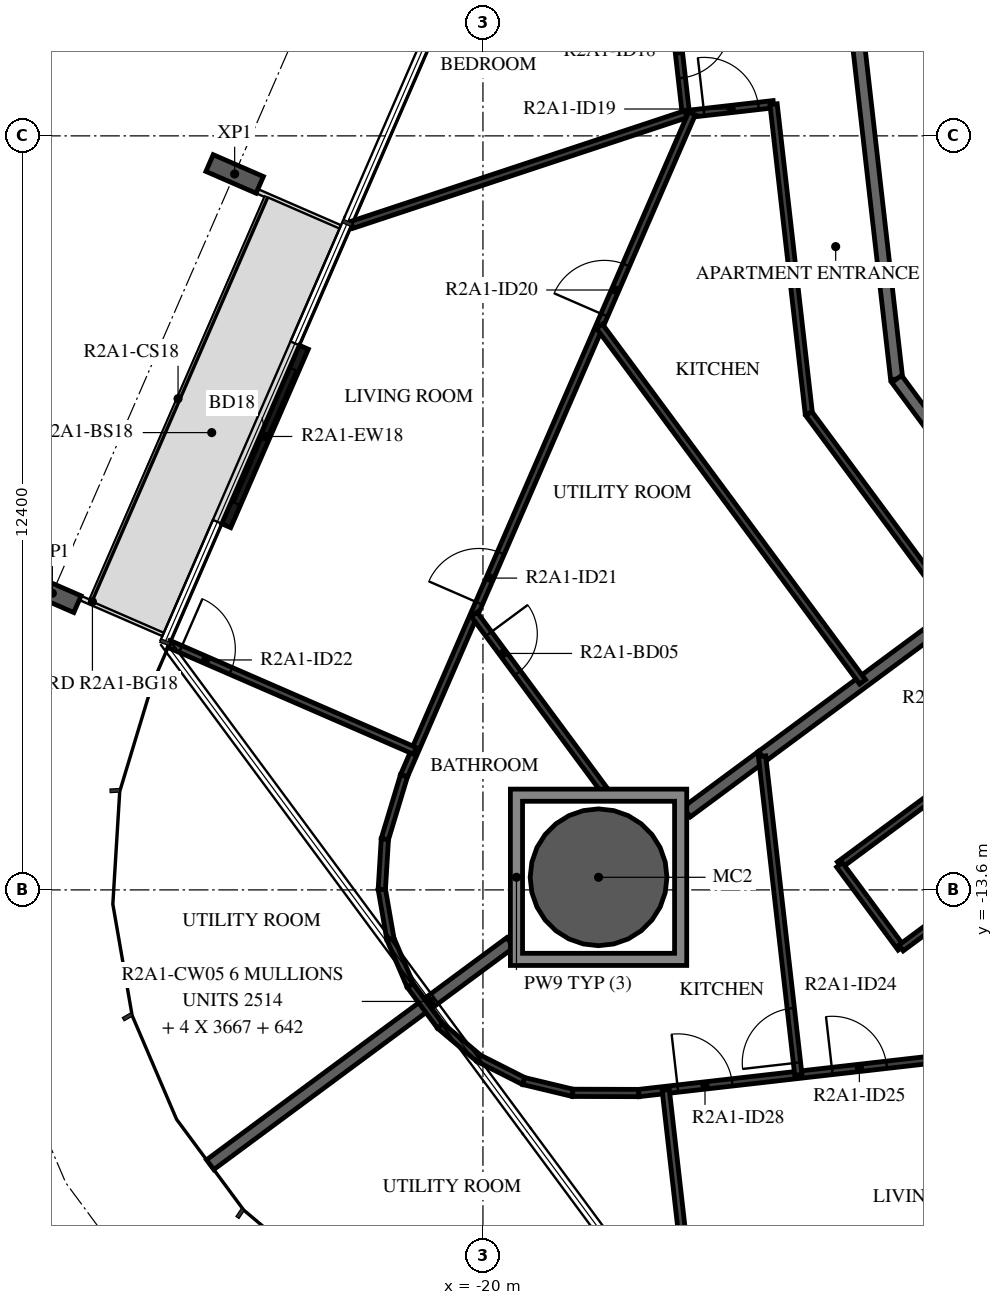
"""IFC4 building model, lengths in metres.
Left out: names, types, materials, properties, quantities, classifications, styles, units other than length and angle.
Written with IfcOpenShell. Run it as: python <this file> out.ifc"""

import sys

from ifc_helpers import new_model, si_unit, direction, frame, frame_2d, origin, origin_2d, place, context, subcontext, project, spatial, polyline, rectangle, hollow_circle, i_section, outline, extrude, element, fill, save


model = new_model("IFC4")
c1 = context("Model", 3, precision=1e-05, world=origin(), true_north=direction((0.0, 1.0)))
c2 = subcontext(c1, "Body", "Model", "MODEL_VIEW")
j1 = project(units=[si_unit("LENGTHUNIT", "METRE"), si_unit("PLANEANGLEUNIT", "RADIAN")], contexts=[c1])
p1 = place(None, origin())
s1 = spatial("IfcSite", under=j1, at=p1, CompositionType="ELEMENT")
p2 = place(p1, origin())
s2 = spatial("IfcBuilding", under=s1, at=p2, CompositionType="ELEMENT")
p3 = place(p2, frame((0.0, 0.0, 80.2)))
s3 = spatial("IfcBuildingStorey", under=s2, at=p3, CompositionType="ELEMENT", Elevation=80.2)
p4 = place(p3, frame((-18.099, -13.393, -0.38), z_axis=(0.0, 0.0, 1.0), x_axis=(1.0, 0.0, 0.0)))
e1 = element("IfcColumn", 1, at=p4, inside=s3, PredefinedType="COLUMN", context=c2, shape_type="SweptSolid", body=[
    extrude(hollow_circle(Radius=1.125, WallThickness=0.055, at=origin_2d()), origin(), (0.0, 0.0, 1.0), 3.5),
])
for number, where, z_axis, x_axis in (
    (2, (-24.083, -1.826, -0.38), (0.0, 0.0, 1.0), (0.399, 0.917, 0.0)),
    (3, (-27.081, -8.722, -0.38), (0.0, 0.0, 1.0), (0.399, 0.917, 0.0)),
):
    element("IfcColumn", number, at=place(p3, frame(where, z_axis=z_axis, x_axis=x_axis)), inside=s3, PredefinedType="COLUMN", context=c2, shape_type="SweptSolid", body=[
        extrude(i_section(OverallWidth=0.3, OverallDepth=0.9, WebThickness=0.019, FlangeThickness=0.035, FilletRadius=0.03, at=origin_2d()), origin(), (0.0, 0.0, 1.0), 3.5),
    ])
p5 = place(p3, frame((-22.945, -4.676, 0.0), z_axis=(0.0, 0.0, 1.0), x_axis=(-0.398784695066, -0.917044582876, 0.0)))
e4 = element("IfcWall", 4, at=p5, inside=s3, PredefinedType="STANDARD", context=c2, shape_type="SweptSolid", body=[
    extrude(rectangle(XDim=3.2, YDim=0.16, at=frame_2d((1.6, 0.0))), origin(), (0.0, 0.0, 1.0), 3.12),
])
p6 = place(p5, frame((0.4, 0.0, 0.0)))
e5 = element("IfcOpeningElement", 5, at=p6, cuts=e4, PredefinedType="OPENING", context=c2, shape_type="SweptSolid", body=[
    extrude(rectangle(XDim=2.4, YDim=2.4, at=frame_2d((1.2, 1.2))), frame((0.0, 0.09, 0.0), z_axis=(0.0, -1.0, 0.0), x_axis=(1.0, 0.0, 0.0)), (0.0, 0.0, 1.0), 0.18),
])
p7 = place(p3, frame((-14.013, 1.974, 0.0), z_axis=(0.0, 0.0, 1.0), x_axis=(0.113196526349, -0.993572617589, 0.0)))
e6 = element("IfcWall", 6, at=p7, inside=s3, PredefinedType="STANDARD", context=c2, shape_type="SweptSolid", body=[
    extrude(rectangle(XDim=7.219, YDim=0.2, at=frame_2d((3.609, 0.0))), origin(), (0.0, 0.0, 1.0), 3.12),
])
p8 = place(p7, frame((0.2, 0.0, 0.0)))
e7 = element("IfcOpeningElement", 7, at=p8, cuts=e6, PredefinedType="OPENING", context=c2, shape_type="SweptSolid", body=[
    extrude(rectangle(XDim=1.0, YDim=2.1, at=frame_2d((0.5, 1.05))), frame((0.0, 0.11, 0.0), z_axis=(0.0, -1.0, 0.0), x_axis=(1.0, 0.0, 0.0)), (0.0, 0.0, 1.0), 0.22),
])
p9 = place(p3, frame((-13.196, -5.198, 0.0), z_axis=(0.0, 0.0, 1.0), x_axis=(0.594805187394, -0.803869883159, 0.0)))
e8 = element("IfcWall", 8, at=p9, inside=s3, PredefinedType="STANDARD", context=c2, shape_type="SweptSolid", body=[
    extrude(rectangle(XDim=7.342, YDim=0.2, at=frame_2d((3.671, 0.0))), origin(), (0.0, 0.0, 1.0), 3.12),
])
p10 = place(p3, frame((-15.41, -11.403, 0.0), z_axis=(0.0, 0.0, 1.0), x_axis=(0.803887568227, 0.594781285558, 0.0)))
e9 = element("IfcWall", 9, at=p10, inside=s3, PredefinedType="STANDARD", context=c2, shape_type="SweptSolid", body=[
    extrude(rectangle(XDim=5.47, YDim=0.2, at=frame_2d((2.735, 0.0))), origin(), (0.0, 0.0, 1.0), 3.12),
])
p11 = place(p3, frame((-16.649, -12.32, 0.0), z_axis=(0.0, 0.0, 1.0), x_axis=(0.803804030903, 0.594894175383, 0.0)))
e10 = element("IfcWall", 10, at=p11, inside=s3, PredefinedType="STANDARD", context=c2, shape_type="SweptSolid", body=[
    extrude(rectangle(XDim=1.542, YDim=0.2, at=frame_2d((0.771, 0.0))), origin(), (0.0, 0.0, 1.0), 3.12),
])
p12 = place(p3, frame((-24.486, -18.119, 0.0), z_axis=(0.0, 0.0, 1.0), x_axis=(0.80384227933, 0.594842491726, 0.0)))
e11 = element("IfcWall", 11, at=p12, inside=s3, PredefinedType="STANDARD", context=c2, shape_type="SweptSolid", body=[
    extrude(rectangle(XDim=6.142, YDim=0.2, at=frame_2d((3.071, 0.0))), origin(), (0.0, 0.0, 1.0), 3.12),
])
p13 = place(p3, frame((-16.854, 0.846, 0.0), z_axis=(0.0, 0.0, 1.0), x_axis=(0.113173930474, -0.993575191649, 0.0)))
e12 = element("IfcWall", 12, at=p13, inside=s3, PredefinedType="PARTITIONING", context=c2, shape_type="SweptSolid", body=[
    extrude(rectangle(XDim=1.7, YDim=0.12, at=frame_2d((0.85, 0.0))), origin(), (0.0, 0.0, 1.0), 3.12),
])
p14 = place(p13, frame((0.2, 0.0, 0.0)))
e13 = element("IfcOpeningElement", 13, at=p14, cuts=e12, PredefinedType="OPENING", context=c2, shape_type="SweptSolid", body=[
    extrude(rectangle(XDim=0.9, YDim=2.1, at=frame_2d((0.45, 1.05))), frame((0.0, 0.07, 0.0), z_axis=(0.0, -1.0, 0.0), x_axis=(1.0, 0.0, 0.0)), (0.0, 0.0, 1.0), 0.14),
])
p15 = place(p3, frame((-16.563, -0.832, 0.0), z_axis=(0.0, 0.0, 1.0), x_axis=(0.993578035261, 0.113148963084, 0.0)))
e14 = element("IfcWall", 14, at=p15, inside=s3, PredefinedType="PARTITIONING", context=c2, shape_type="SweptSolid", body=[
    extrude(rectangle(XDim=1.351, YDim=0.12, at=frame_2d((0.675, 0.0))), origin(), (0.0, 0.0, 1.0), 3.12),
])
p16 = place(p15, frame((0.2, 0.0, 0.0)))
e15 = element("IfcOpeningElement", 15, at=p16, cuts=e14, PredefinedType="OPENING", context=c2, shape_type="SweptSolid", body=[
    extrude(rectangle(XDim=0.9, YDim=2.1, at=frame_2d((0.45, 1.05))), frame((0.0, 0.07, 0.0), z_axis=(0.0, -1.0, 0.0), x_axis=(1.0, 0.0, 0.0)), (0.0, 0.0, 1.0), 0.14),
])
p17 = place(p3, frame((-15.221, -0.679, 0.0), z_axis=(0.0, 0.0, 1.0), x_axis=(0.113219875647, -0.993569957154, 0.0)))
e16 = element("IfcWall", 16, at=p17, inside=s3, PredefinedType="PARTITIONING", context=c2, shape_type="SweptSolid", body=[
    extrude(rectangle(XDim=5.121, YDim=0.12, at=frame_2d((2.561, 0.0))), origin(), (0.0, 0.0, 1.0), 3.12),
])
p18 = place(p3, frame((-14.641, -5.767, 0.0), z_axis=(0.0, 0.0, 1.0), x_axis=(0.594825885962, -0.803854567313, 0.0)))
e17 = element("IfcWall", 17, at=p18, inside=s3, PredefinedType="PARTITIONING", context=c2, shape_type="SweptSolid", body=[
    extrude(rectangle(XDim=6.266, YDim=0.12, at=frame_2d((3.133, 0.0))), origin(), (0.0, 0.0, 1.0), 3.12),
])
p19 = place(p18, frame((4.273, 0.0, 0.0)))
e18 = element("IfcOpeningElement", 18, at=p19, cuts=e17, PredefinedType="OPENING", context=c2, shape_type="SweptSolid", body=[
    extrude(rectangle(XDim=0.9, YDim=2.1, at=frame_2d((0.45, 1.05))), frame((0.0, 0.07, 0.0), z_axis=(0.0, -1.0, 0.0), x_axis=(1.0, 0.0, 0.0)), (0.0, 0.0, 1.0), 0.14),
])
p20 = place(p3, frame((-22.157, -2.664, 0.0), z_axis=(0.0, 0.0, 1.0), x_axis=(0.949263673698, 0.314481283698, 0.0)))
e19 = element("IfcWall", 19, at=p20, inside=s3, PredefinedType="PARTITIONING", context=c2, shape_type="SweptSolid", body=[
    extrude(rectangle(XDim=5.789, YDim=0.12, at=frame_2d((2.895, 0.0))), origin(), (0.0, 0.0, 1.0), 3.12),
])
p21 = place(p3, frame((-21.298, -11.722, 0.0), z_axis=(0.0, 0.0, 1.0), x_axis=(0.398737387658, 0.917065153456, 0.0)))
e20 = element("IfcWall", 20, at=p21, inside=s3, PredefinedType="PARTITIONING", context=c2, shape_type="SweptSolid", body=[
    extrude(rectangle(XDim=11.875, YDim=0.12, at=frame_2d((5.938, 0.0))), origin(), (0.0, 0.0, 1.0), 3.12),
])
p22 = place(p21, frame((8.26, 0.0, 0.0)))
e21 = element("IfcOpeningElement", 21, at=p22, cuts=e20, PredefinedType="OPENING", context=c2, shape_type="SweptSolid", body=[
    extrude(rectangle(XDim=0.9, YDim=2.1, at=frame_2d((0.45, 1.05))), frame((0.0, 0.07, 0.0), z_axis=(0.0, -1.0, 0.0), x_axis=(1.0, 0.0, 0.0)), (0.0, 0.0, 1.0), 0.14),
])
p23 = place(p21, frame((3.094, 0.0, 0.0)))
e22 = element("IfcOpeningElement", 22, at=p23, cuts=e20, PredefinedType="OPENING", context=c2, shape_type="SweptSolid", body=[
    extrude(rectangle(XDim=0.9, YDim=2.1, at=frame_2d((0.45, 1.05))), frame((0.0, 0.07, 0.0), z_axis=(0.0, -1.0, 0.0), x_axis=(1.0, 0.0, 0.0)), (0.0, 0.0, 1.0), 0.14),
])
p24 = place(p3, frame((-25.156, -9.559, 0.0), z_axis=(0.0, 0.0, 1.0), x_axis=(0.917042707292, -0.398789008127, 0.0)))
e23 = element("IfcWall", 23, at=p24, inside=s3, PredefinedType="PARTITIONING", context=c2, shape_type="SweptSolid", body=[
    extrude(rectangle(XDim=4.4, YDim=0.12, at=frame_2d((2.2, 0.0))), origin(), (0.0, 0.0, 1.0), 2.73),
])
p25 = place(p24, frame((0.2, 0.0, 0.0)))
e24 = element("IfcOpeningElement", 24, at=p25, cuts=e23, PredefinedType="OPENING", context=c2, shape_type="SweptSolid", body=[
    extrude(rectangle(XDim=0.9, YDim=2.1, at=frame_2d((0.45, 1.05))), frame((0.0, 0.07, 0.0), z_axis=(0.0, -1.0, 0.0), x_axis=(1.0, 0.0, 0.0)), (0.0, 0.0, 1.0), 0.14),
])
p26 = place(p3, frame((-18.084, -4.331, 0.0), z_axis=(0.0, 0.0, 1.0), x_axis=(0.594811782108, -0.803865003508, 0.0)))
e25 = element("IfcWall", 25, at=p26, inside=s3, PredefinedType="PARTITIONING", context=c2, shape_type="SweptSolid", body=[
    extrude(rectangle(XDim=7.276, YDim=0.12, at=frame_2d((3.638, 0.0))), origin(), (0.0, 0.0, 1.0), 3.12),
])
p27 = place(p3, frame((-20.144, -9.068, 0.0), z_axis=(0.0, 0.0, 1.0), x_axis=(0.59487477233, -0.803818390711, 0.0)))
e26 = element("IfcWall", 26, at=p27, inside=s3, PredefinedType="PARTITIONING", context=c2, shape_type="SweptSolid", body=[
    extrude(rectangle(XDim=3.575, YDim=0.12, at=frame_2d((1.788, 0.0))), origin(), (0.0, 0.0, 1.0), 3.12),
])
p28 = place(p27, frame((0.4, 0.0, 0.0)))
e27 = element("IfcOpeningElement", 27, at=p28, cuts=e26, PredefinedType="OPENING", context=c2, shape_type="SweptSolid", body=[
    extrude(rectangle(XDim=0.8, YDim=2.1, at=frame_2d((0.4, 1.05))), frame((0.0, 0.07, 0.0), z_axis=(0.0, -1.0, 0.0), x_axis=(1.0, 0.0, 0.0)), (0.0, 0.0, 1.0), 0.14),
])
for number, where, z_axis, x_axis in (
    (28, (-20.703, -15.835, 0.0), (0.0, 0.0, 1.0), (-0.595, 0.804, 0.0)),
    (29, (-21.196, -15.168, 0.0), (0.0, 0.0, 1.0), (-0.394, 0.919, 0.0)),
):
    element("IfcWall", number, at=place(p3, frame(where, z_axis=z_axis, x_axis=x_axis)), inside=s3, PredefinedType="PARTITIONING", context=c2, shape_type="SweptSolid", body=[
        extrude(rectangle(XDim=0.829, YDim=0.12, at=frame_2d((0.415, 0.0))), origin(), (0.0, 0.0, 1.0), 3.12),
    ])
p29 = place(p3, frame((-21.522, -14.406, 0.0), z_axis=(0.0, 0.0, 1.0), x_axis=(-0.170794347099, 0.985306698952, 0.0)))
e30 = element("IfcWall", 30, at=p29, inside=s3, PredefinedType="PARTITIONING", context=c2, shape_type="SweptSolid", body=[
    extrude(rectangle(XDim=0.829, YDim=0.12, at=frame_2d((0.415, 0.0))), origin(), (0.0, 0.0, 1.0), 3.12),
])
p30 = place(p3, frame((-21.664, -13.59, 0.0), z_axis=(0.0, 0.0, 1.0), x_axis=(0.061277779288, 0.998120751095, 0.0)))
e31 = element("IfcWall", 31, at=p30, inside=s3, PredefinedType="PARTITIONING", context=c2, shape_type="SweptSolid", body=[
    extrude(rectangle(XDim=0.829, YDim=0.12, at=frame_2d((0.414, 0.0))), origin(), (0.0, 0.0, 1.0), 3.12),
])
p31 = place(p3, frame((-21.613, -12.762, 0.0), z_axis=(0.0, 0.0, 1.0), x_axis=(0.289552239308, 0.95716221233, 0.0)))
e32 = element("IfcWall", 32, at=p31, inside=s3, PredefinedType="PARTITIONING", context=c2, shape_type="SweptSolid", body=[
    extrude(rectangle(XDim=1.087, YDim=0.12, at=frame_2d((0.543, 0.0))), origin(), (0.0, 0.0, 1.0), 3.12),
])
p32 = place(p3, frame((-10.914, -10.804, 0.0), z_axis=(0.0, 0.0, 1.0), x_axis=(-0.803864616889, -0.594812304609, 0.0)))
e33 = element("IfcWall", 33, at=p32, inside=s3, PredefinedType="PARTITIONING", context=c2, shape_type="SweptSolid", body=[
    extrude(rectangle(XDim=4.008, YDim=0.12, at=frame_2d((2.004, 0.0))), origin(), (0.0, 0.0, 1.0), 3.12),
])
p33 = place(p3, frame((-14.136, -13.188, 0.0), z_axis=(0.0, 0.0, 1.0), x_axis=(0.594863421241, -0.803826791087, 0.0)))
e34 = element("IfcWall", 34, at=p33, inside=s3, PredefinedType="PARTITIONING", context=c2, shape_type="SweptSolid", body=[
    extrude(rectangle(XDim=1.7, YDim=0.12, at=frame_2d((0.85, 0.0))), origin(), (0.0, 0.0, 1.0), 3.12),
])
p34 = place(p3, frame((-13.125, -14.555, 0.0), z_axis=(0.0, 0.0, 1.0), x_axis=(0.80389374229, 0.594772940799, 0.0)))
e35 = element("IfcWall", 35, at=p34, inside=s3, PredefinedType="PARTITIONING", context=c2, shape_type="SweptSolid", body=[
    extrude(rectangle(XDim=4.008, YDim=0.12, at=frame_2d((2.004, 0.0))), origin(), (0.0, 0.0, 1.0), 3.12),
])
for number, where, z_axis, x_axis in (
    (36, (-20.703, -15.835, 0.0), (0.0, 0.0, 1.0), (0.764, -0.645, 0.0)),
    (37, (-20.069, -16.369, 0.0), (0.0, 0.0, 1.0), (0.892, -0.451, 0.0)),
):
    element("IfcWall", number, at=place(p3, frame(where, z_axis=z_axis, x_axis=x_axis)), inside=s3, PredefinedType="PARTITIONING", context=c2, shape_type="SweptSolid", body=[
        extrude(rectangle(XDim=0.829, YDim=0.12, at=frame_2d((0.415, 0.0))), origin(), (0.0, 0.0, 1.0), 3.12),
    ])
p35 = place(p3, frame((-19.33, -16.744, 0.0), z_axis=(0.0, 0.0, 1.0), x_axis=(0.972403343288, -0.23330610357, 0.0)))
e38 = element("IfcWall", 38, at=p35, inside=s3, PredefinedType="PARTITIONING", context=c2, shape_type="SweptSolid", body=[
    extrude(rectangle(XDim=0.829, YDim=0.12, at=frame_2d((0.415, 0.0))), origin(), (0.0, 0.0, 1.0), 3.12),
])
p36 = place(p3, frame((-18.524, -16.937, 0.0), z_axis=(0.0, 0.0, 1.0), x_axis=(0.999995736722, -0.00292002349, 0.0)))
e39 = element("IfcWall", 39, at=p36, inside=s3, PredefinedType="PARTITIONING", context=c2, shape_type="SweptSolid", body=[
    extrude(rectangle(XDim=1.087, YDim=0.12, at=frame_2d((0.543, 0.0))), origin(), (0.0, 0.0, 1.0), 3.12),
])
p37 = place(p3, frame((-17.437, -16.94, 0.0), z_axis=(0.0, 0.0, 1.0), x_axis=(0.993573314119, 0.113190412448, 0.0)))
e40 = element("IfcWall", 40, at=p37, inside=s3, PredefinedType="PARTITIONING", context=c2, shape_type="SweptSolid", body=[
    extrude(rectangle(XDim=14.576, YDim=0.12, at=frame_2d((7.288, 0.0))), origin(), (0.0, 0.0, 1.0), 3.12),
])
p38 = place(p37, frame((3.201, 0.0, 0.0)))
e41 = element("IfcOpeningElement", 41, at=p38, cuts=e40, PredefinedType="OPENING", context=c2, shape_type="SweptSolid", body=[
    extrude(rectangle(XDim=0.9, YDim=2.1, at=frame_2d((0.45, 1.05))), frame((0.0, 0.07, 0.0), z_axis=(0.0, -1.0, 0.0), x_axis=(1.0, 0.0, 0.0)), (0.0, 0.0, 1.0), 0.14),
])
p39 = place(p37, frame((0.645, 0.0, 0.0)))
e42 = element("IfcOpeningElement", 42, at=p39, cuts=e40, PredefinedType="OPENING", context=c2, shape_type="SweptSolid", body=[
    extrude(rectangle(XDim=0.9, YDim=2.1, at=frame_2d((0.45, 1.05))), frame((0.0, 0.07, 0.0), z_axis=(0.0, -1.0, 0.0), x_axis=(1.0, 0.0, 0.0)), (0.0, 0.0, 1.0), 0.14),
])
p40 = place(p3, frame((-14.813, -16.641, 0.0), z_axis=(0.0, 0.0, 1.0), x_axis=(-0.113210971478, 0.993570971767, 0.0)))
e43 = element("IfcWall", 43, at=p40, inside=s3, PredefinedType="PARTITIONING", context=c2, shape_type="SweptSolid", body=[
    extrude(rectangle(XDim=5.273, YDim=0.12, at=frame_2d((2.636, 0.0))), origin(), (0.0, 0.0, 1.0), 3.12),
])
p41 = place(p40, frame((0.2, 0.0, 0.0)))
e44 = element("IfcOpeningElement", 44, at=p41, cuts=e43, PredefinedType="OPENING", context=c2, shape_type="SweptSolid", body=[
    extrude(rectangle(XDim=0.9, YDim=2.1, at=frame_2d((0.45, 1.05))), frame((0.0, 0.07, 0.0), z_axis=(0.0, -1.0, 0.0), x_axis=(1.0, 0.0, 0.0)), (0.0, 0.0, 1.0), 0.14),
])
p42 = place(p3, frame((-16.496, -21.262, 0.0), z_axis=(0.0, 0.0, 1.0), x_axis=(-0.1132445713, 0.993567142709, 0.0)))
e45 = element("IfcWall", 45, at=p42, inside=s3, PredefinedType="PARTITIONING", context=c2, shape_type="SweptSolid", body=[
    extrude(rectangle(XDim=4.4, YDim=0.12, at=frame_2d((2.2, 0.0))), origin(), (0.0, 0.0, 1.0), 2.73),
])
p43 = place(p42, frame((0.2, 0.0, 0.0)))
e46 = element("IfcOpeningElement", 46, at=p43, cuts=e45, PredefinedType="OPENING", context=c2, shape_type="SweptSolid", body=[
    extrude(rectangle(XDim=0.9, YDim=2.1, at=frame_2d((0.45, 1.05))), frame((0.0, 0.07, 0.0), z_axis=(0.0, -1.0, 0.0), x_axis=(1.0, 0.0, 0.0)), (0.0, 0.0, 1.0), 0.14),
])
p44 = place(p3, origin())
e47 = element("IfcWall", 47, at=p44, inside=s3, PredefinedType="STANDARD", context=c2, shape_type="SweptSolid", body=[
    extrude(outline(polyline([(-16.649, -11.942), (-16.649, -14.843), (-19.549, -14.843), (-19.549, -11.942), (-16.649, -11.942)]), holes=[polyline([(-19.349, -14.643), (-16.849, -14.643), (-16.849, -12.143), (-19.349, -12.143), (-19.349, -14.643)])]), origin(), (0.0, 0.0, 1.0), 3.12),
])
p45 = place(p6, origin())
e48 = element("IfcDoor", 48, at=p45, inside=s3, OperationType="DOUBLE_DOOR_SLIDING", PredefinedType="DOOR", context=c2, shape_type="SweptSolid", body=[
    extrude(rectangle(XDim=2.4, YDim=2.4, at=frame_2d((1.2, 1.2))), frame((0.0, 0.025, 0.0), z_axis=(0.0, -1.0, 0.0), x_axis=(1.0, 0.0, 0.0)), (0.0, 0.0, 1.0), 0.05),
])
fill(e5, e48)
p46 = place(p14, origin())
e49 = element("IfcDoor", 49, at=p46, inside=s3, OperationType="SINGLE_SWING_RIGHT", PredefinedType="DOOR", context=c2, shape_type="SweptSolid", body=[
    extrude(rectangle(XDim=0.9, YDim=2.1, at=frame_2d((0.45, 1.05))), frame((0.0, 0.025, 0.0), z_axis=(0.0, -1.0, 0.0), x_axis=(1.0, 0.0, 0.0)), (0.0, 0.0, 1.0), 0.05),
])
fill(e13, e49)
p47 = place(p16, origin())
e50 = element("IfcDoor", 50, at=p47, inside=s3, OperationType="SINGLE_SWING_LEFT", PredefinedType="DOOR", context=c2, shape_type="SweptSolid", body=[
    extrude(rectangle(XDim=0.9, YDim=2.1, at=frame_2d((0.45, 1.05))), frame((0.0, 0.025, 0.0), z_axis=(0.0, -1.0, 0.0), x_axis=(1.0, 0.0, 0.0)), (0.0, 0.0, 1.0), 0.05),
])
fill(e15, e50)
p48 = place(p22, origin())
e51 = element("IfcDoor", 51, at=p48, inside=s3, OperationType="SINGLE_SWING_RIGHT", PredefinedType="DOOR", context=c2, shape_type="SweptSolid", body=[
    extrude(rectangle(XDim=0.9, YDim=2.1, at=frame_2d((0.45, 1.05))), frame((0.0, 0.025, 0.0), z_axis=(0.0, -1.0, 0.0), x_axis=(1.0, 0.0, 0.0)), (0.0, 0.0, 1.0), 0.05),
])
fill(e21, e51)
p49 = place(p23, origin())
e52 = element("IfcDoor", 52, at=p49, inside=s3, OperationType="SINGLE_SWING_LEFT", PredefinedType="DOOR", context=c2, shape_type="SweptSolid", body=[
    extrude(rectangle(XDim=0.9, YDim=2.1, at=frame_2d((0.45, 1.05))), frame((0.0, 0.025, 0.0), z_axis=(0.0, -1.0, 0.0), x_axis=(1.0, 0.0, 0.0)), (0.0, 0.0, 1.0), 0.05),
])
fill(e22, e52)
p50 = place(p28, origin())
e53 = element("IfcDoor", 53, at=p50, inside=s3, OperationType="SINGLE_SWING_RIGHT", PredefinedType="DOOR", context=c2, shape_type="SweptSolid", body=[
    extrude(rectangle(XDim=0.8, YDim=2.1, at=frame_2d((0.4, 1.05))), frame((0.0, 0.025, 0.0), z_axis=(0.0, -1.0, 0.0), x_axis=(1.0, 0.0, 0.0)), (0.0, 0.0, 1.0), 0.05),
])
fill(e27, e53)
p51 = place(p25, origin())
e54 = element("IfcDoor", 54, at=p51, inside=s3, OperationType="SINGLE_SWING_RIGHT", PredefinedType="DOOR", context=c2, shape_type="SweptSolid", body=[
    extrude(rectangle(XDim=0.9, YDim=2.1, at=frame_2d((0.45, 1.05))), frame((0.0, 0.025, 0.0), z_axis=(0.0, -1.0, 0.0), x_axis=(1.0, 0.0, 0.0)), (0.0, 0.0, 1.0), 0.05),
])
fill(e24, e54)
p52 = place(p41, origin())
e55 = element("IfcDoor", 55, at=p52, inside=s3, OperationType="SINGLE_SWING_LEFT", PredefinedType="DOOR", context=c2, shape_type="SweptSolid", body=[
    extrude(rectangle(XDim=0.9, YDim=2.1, at=frame_2d((0.45, 1.05))), frame((0.0, 0.025, 0.0), z_axis=(0.0, -1.0, 0.0), x_axis=(1.0, 0.0, 0.0)), (0.0, 0.0, 1.0), 0.05),
])
fill(e44, e55)
p53 = place(p38, origin())
e56 = element("IfcDoor", 56, at=p53, inside=s3, OperationType="SINGLE_SWING_LEFT", PredefinedType="DOOR", context=c2, shape_type="SweptSolid", body=[
    extrude(rectangle(XDim=0.9, YDim=2.1, at=frame_2d((0.45, 1.05))), frame((0.0, 0.025, 0.0), z_axis=(0.0, -1.0, 0.0), x_axis=(1.0, 0.0, 0.0)), (0.0, 0.0, 1.0), 0.05),
])
fill(e41, e56)
p54 = place(p39, origin())
e57 = element("IfcDoor", 57, at=p54, inside=s3, OperationType="SINGLE_SWING_RIGHT", PredefinedType="DOOR", context=c2, shape_type="SweptSolid", body=[
    extrude(rectangle(XDim=0.9, YDim=2.1, at=frame_2d((0.45, 1.05))), frame((0.0, 0.025, 0.0), z_axis=(0.0, -1.0, 0.0), x_axis=(1.0, 0.0, 0.0)), (0.0, 0.0, 1.0), 0.05),
])
fill(e42, e57)
save(model, sys.argv[1])
